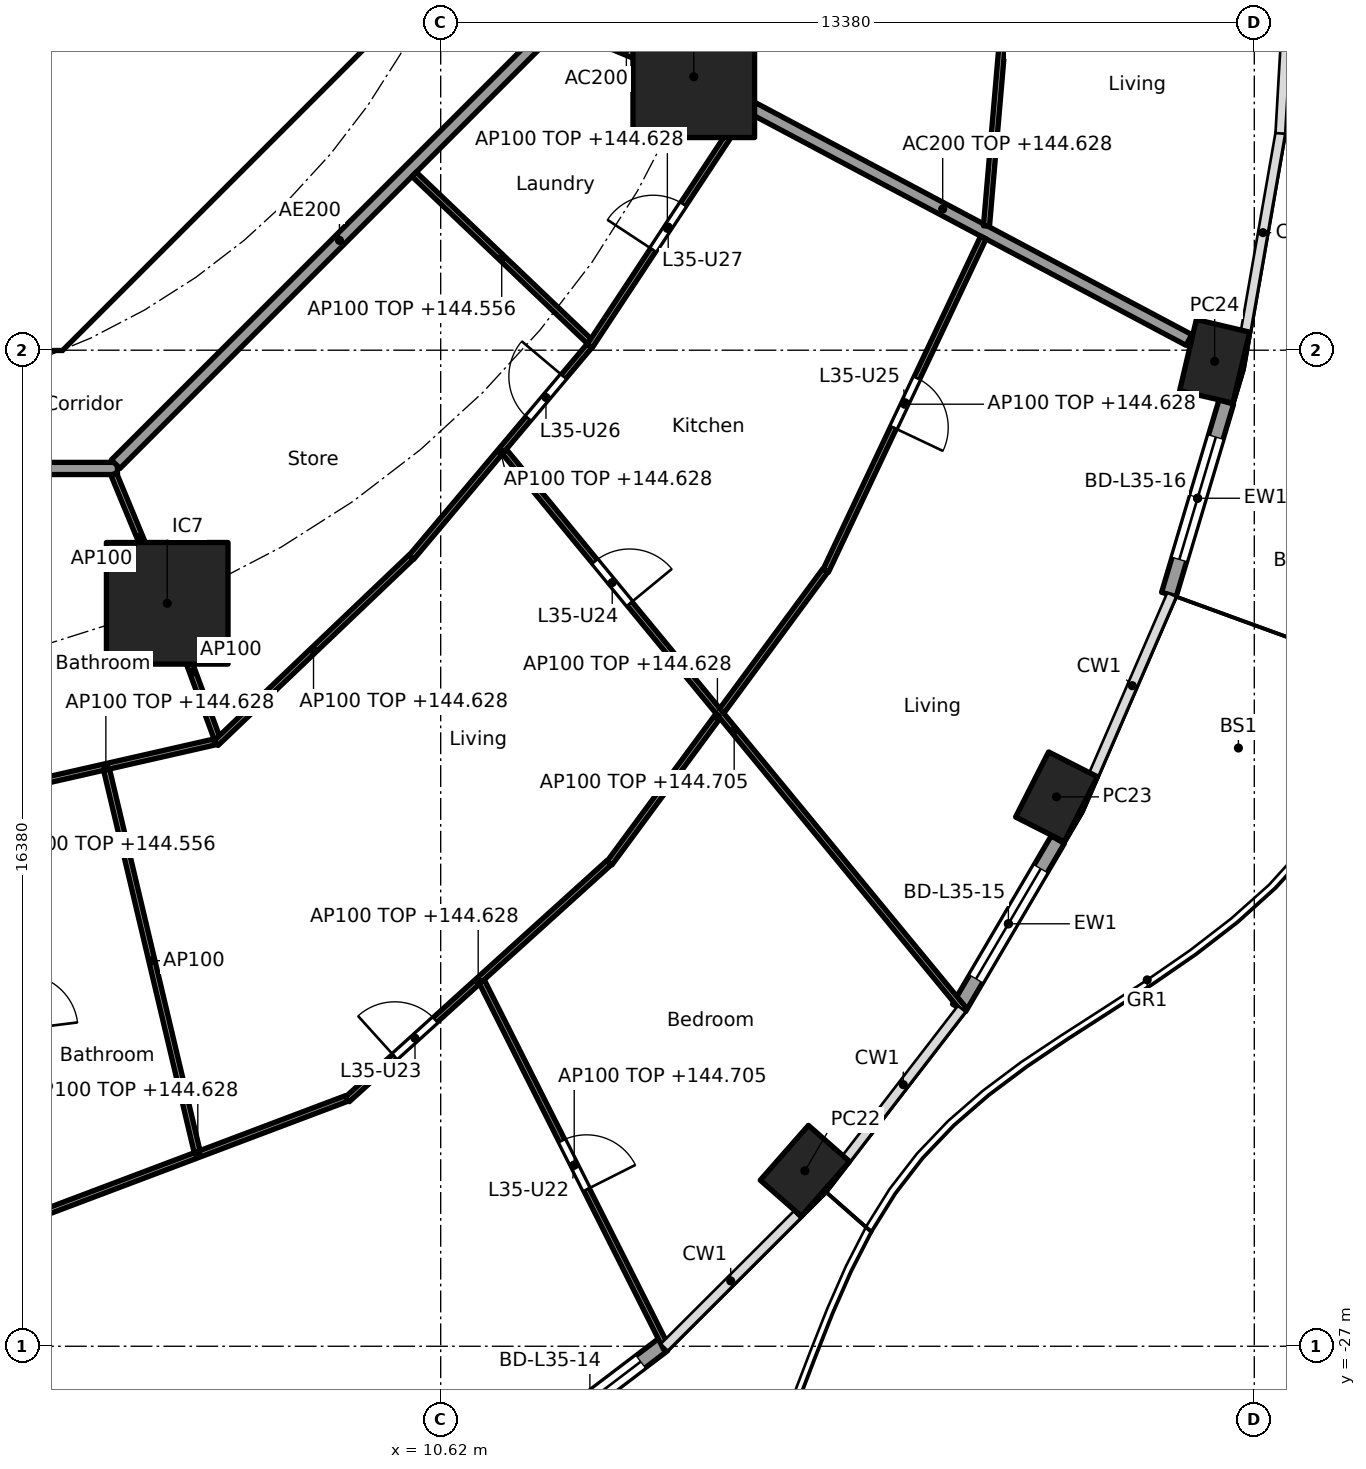
"""IFC4 building model, lengths in metres.
Left out: names, types, materials, properties, quantities, classifications, styles, units other than length and angle.
Written with IfcOpenShell. Run it as: python <this file> out.ifc"""

import sys

from ifc_helpers import new_model, si_unit, direction, frame, frame_2d, origin, origin_2d, place, context, subcontext, project, spatial, polyline, rectangle, hollow_rectangle, outline, extrude, element, fill, save


model = new_model("IFC4")
c1 = context("Model", 3, precision=1e-05, world=origin(), true_north=direction((0.0, 1.0)))
c2 = subcontext(c1, "Body", "Model", "MODEL_VIEW")
j1 = project(units=[si_unit("LENGTHUNIT", "METRE"), si_unit("PLANEANGLEUNIT", "RADIAN")], contexts=[c1])
p1 = place(None, origin())
s1 = spatial("IfcSite", under=j1, at=p1, CompositionType="ELEMENT")
p2 = place(p1, origin())
s2 = spatial("IfcBuilding", under=s1, at=p2, CompositionType="ELEMENT")
p3 = place(p2, frame((0.0, 0.0, 141.8)))
s3 = spatial("IfcBuildingStorey", under=s2, at=p3, CompositionType="ELEMENT", Elevation=141.8)
for number, where, z_axis, x_axis in (
    (1, (16.61, -24.115, 0.0), (0.0, 0.0, 1.0), (0.66, 0.751, 0.0)),
    (2, (20.747, -17.965, 0.0), (0.0, 0.0, 1.0), (0.452, 0.892, 0.0)),
    (3, (23.348, -10.803, 0.0), (0.0, 0.0, 1.0), (0.229, 0.973, 0.0)),
):
    element("IfcColumn", number, at=place(p3, frame(where, z_axis=z_axis, x_axis=x_axis)), inside=s3, PredefinedType="COLUMN", context=c2, shape_type="SweptSolid", body=[
        extrude(hollow_rectangle(XDim=1.2, YDim=0.9, WallThickness=0.04, at=origin_2d()), origin(), (0.0, 0.0, 1.0), 3.7),
    ])
for number, where, z_axis, x_axis in (
    (4, (6.123, -14.782, 0.0), (0.0, 0.0, 1.0), (1.0, 0.0, 0.0)),
    (5, (14.782, -6.123, 0.0), (0.0, 0.0, 1.0), (1.0, 0.0, 0.0)),
):
    element("IfcColumn", number, at=place(p3, frame(where, z_axis=z_axis, x_axis=x_axis)), inside=s3, PredefinedType="COLUMN", context=c2, shape_type="SweptSolid", body=[
        extrude(rectangle(XDim=2.0, YDim=2.0, at=origin_2d()), origin(), (0.0, 0.0, 1.0), 3.7),
    ])
p4 = place(p3, frame((14.278, -26.973, 0.0), z_axis=(0.0, 0.0, 1.0), x_axis=(-0.796022231079, -0.605267385233, 0.0)))
e6 = element("IfcWall", 6, at=p4, inside=s3, PredefinedType="SOLIDWALL", context=c2, shape_type="SweptSolid", body=[
    extrude(rectangle(XDim=3.026, YDim=0.25, at=frame_2d((1.513, 0.0))), origin(), (0.0, 0.0, 1.0), 3.44),
])
p5 = place(p4, frame((0.463, 0.0, 0.0)))
e7 = element("IfcOpeningElement", 7, at=p5, cuts=e6, PredefinedType="OPENING", context=c2, shape_type="SweptSolid", body=[
    extrude(rectangle(XDim=2.1, YDim=2.4, at=frame_2d((1.05, 1.2))), frame((0.0, 0.135, 0.0), z_axis=(0.0, -1.0, 0.0), x_axis=(1.0, 0.0, 0.0)), (0.0, 0.0, 1.0), 0.27),
])
p6 = place(p3, frame((20.768, -18.669, 0.0), z_axis=(0.0, 0.0, 1.0), x_axis=(-0.506314982873, -0.862348617508, 0.0)))
e8 = element("IfcWall", 8, at=p6, inside=s3, PredefinedType="SOLIDWALL", context=c2, shape_type="SweptSolid", body=[
    extrude(rectangle(XDim=3.208, YDim=0.25, at=frame_2d((1.604, 0.0))), origin(), (0.0, 0.0, 1.0), 3.44),
])
p7 = place(p6, frame((0.554, 0.0, 0.0)))
e9 = element("IfcOpeningElement", 9, at=p7, cuts=e8, PredefinedType="OPENING", context=c2, shape_type="SweptSolid", body=[
    extrude(rectangle(XDim=2.1, YDim=2.4, at=frame_2d((1.05, 1.2))), frame((0.0, 0.135, 0.0), z_axis=(0.0, -1.0, 0.0), x_axis=(1.0, 0.0, 0.0)), (0.0, 0.0, 1.0), 0.27),
])
p8 = place(p3, frame((23.54, -11.472, 0.0), z_axis=(0.0, 0.0, 1.0), x_axis=(-0.285821792767, -0.958282788523, 0.0)))
e10 = element("IfcWall", 10, at=p8, inside=s3, PredefinedType="SOLIDWALL", context=c2, shape_type="SweptSolid", body=[
    extrude(rectangle(XDim=3.303, YDim=0.25, at=frame_2d((1.651, 0.0))), origin(), (0.0, 0.0, 1.0), 3.44),
])
p9 = place(p8, frame((0.602, 0.0, 0.0)))
e11 = element("IfcOpeningElement", 11, at=p9, cuts=e10, PredefinedType="OPENING", context=c2, shape_type="SweptSolid", body=[
    extrude(rectangle(XDim=2.1, YDim=2.4, at=frame_2d((1.05, 1.2))), frame((0.0, 0.135, 0.0), z_axis=(0.0, -1.0, 0.0), x_axis=(1.0, 0.0, 0.0)), (0.0, 0.0, 1.0), 0.27),
])
p10 = place(p3, frame((4.613, -9.988, 0.0), z_axis=(0.0, 0.0, 1.0), x_axis=(0.707106781187, 0.707106781187, 0.0)))
e12 = element("IfcWall", 12, at=p10, inside=s3, PredefinedType="SHEAR", context=c2, shape_type="SweptSolid", body=[
    extrude(rectangle(XDim=7.602, YDim=0.6, at=frame_2d((3.801, 0.0))), origin(), (0.0, 0.0, 1.0), 3.44),
])
p11 = place(p10, frame((3.201, 0.0, 0.0)))
e13 = element("IfcOpeningElement", 13, at=p11, cuts=e12, PredefinedType="OPENING", context=c2, shape_type="SweptSolid", body=[
    extrude(rectangle(XDim=1.2, YDim=2.1, at=frame_2d((0.6, 1.05))), frame((0.0, 0.31, 0.0), z_axis=(0.0, -1.0, 0.0), x_axis=(1.0, 0.0, 0.0)), (0.0, 0.0, 1.0), 0.62),
])
p12 = place(p3, origin())
e14 = element("IfcWall", 14, at=p12, inside=s3, PredefinedType="SHEAR", context=c2, shape_type="SweptSolid", body=[
    extrude(outline(polyline([(-4.152, -10.025), (4.152, -10.025), (4.401, -9.776), (4.825, -10.2), (4.401, -10.625), (-4.401, -10.625), (-4.825, -10.2), (-4.401, -9.776), (-4.152, -10.025)])), origin(), (0.0, 0.0, 1.0), 3.44),
])
p13 = place(p3, frame((12.657, -5.243, 0.0), z_axis=(0.0, 0.0, 1.0), x_axis=(0.923846436004, -0.382763324632, 0.0)))
e15 = element("IfcWall", 15, at=p13, inside=s3, PredefinedType="PARTITIONING", context=c2, shape_type="SweptSolid", body=[
    extrude(rectangle(XDim=2.2, YDim=0.2, at=frame_2d((1.1, 0.0))), origin(), (0.0, 0.0, 1.0), 3.44),
])
p14 = place(p3, frame((14.826, -6.146, 0.0), z_axis=(0.0, 0.0, 1.0), x_axis=(0.883012998471, -0.469348532044, 0.0)))
e16 = element("IfcWall", 16, at=p14, inside=s3, PredefinedType="PARTITIONING", context=c2, shape_type="SweptSolid", body=[
    extrude(rectangle(XDim=9.172, YDim=0.2, at=frame_2d((4.586, 0.0))), origin(), (0.0, 0.0, 1.0), 2.828),
])
p15 = place(p3, frame((-5.104, -12.565, 0.0), z_axis=(0.0, 0.0, 1.0), x_axis=(1.0, 0.0, 0.0)))
e17 = element("IfcWall", 17, at=p15, inside=s3, PredefinedType="PARTITIONING", context=c2, shape_type="SweptSolid", body=[
    extrude(rectangle(XDim=10.409, YDim=0.2, at=frame_2d((5.205, 0.0))), origin(), (0.0, 0.0, 1.0), 3.44),
])
p16 = place(p15, frame((5.906, 0.0, 0.0)))
e18 = element("IfcOpeningElement", 18, at=p16, cuts=e17, PredefinedType="OPENING", context=c2, shape_type="SweptSolid", body=[
    extrude(rectangle(XDim=1.0, YDim=2.1, at=frame_2d((0.5, 1.05))), frame((0.0, 0.11, 0.0), z_axis=(0.0, -1.0, 0.0), x_axis=(1.0, 0.0, 0.0)), (0.0, 0.0, 1.0), 0.22),
])
p17 = place(p3, frame((5.275, -12.494, 0.0), z_axis=(0.0, 0.0, 1.0), x_axis=(0.707106781187, 0.707106781187, 0.0)))
e19 = element("IfcWall", 19, at=p17, inside=s3, PredefinedType="PARTITIONING", context=c2, shape_type="SweptSolid", body=[
    extrude(rectangle(XDim=10.409, YDim=0.2, at=frame_2d((5.205, 0.0))), origin(), (0.0, 0.0, 1.0), 3.44),
])
p18 = place(p3, frame((15.849, -2.158, 0.0), z_axis=(0.0, 0.0, 1.0), x_axis=(-0.03838348155, -0.999263082648, 0.0)))
e20 = element("IfcWall", 20, at=p18, inside=s3, PredefinedType="PARTITIONING", context=c2, shape_type="SweptSolid", body=[
    extrude(rectangle(XDim=4.344, YDim=0.1, at=frame_2d((2.172, 0.0))), origin(), (0.0, 0.0, 1.0), 3.44),
])
p19 = place(p3, frame((20.106, -2.642, 0.0), z_axis=(0.0, 0.0, 1.0), x_axis=(-0.085694058383, -0.996321498492, 0.0)))
e21 = element("IfcWall", 21, at=p19, inside=s3, PredefinedType="PARTITIONING", context=c2, shape_type="SweptSolid", body=[
    extrude(rectangle(XDim=5.957, YDim=0.1, at=frame_2d((2.979, 0.0))), origin(), (0.0, 0.0, 1.0), 2.828),
])
p20 = place(p3, frame((3.317, -17.878, 0.0), z_axis=(0.0, 0.0, 1.0), x_axis=(0.975099660451, 0.221767112505, 0.0)))
e22 = element("IfcWall", 22, at=p20, inside=s3, PredefinedType="PARTITIONING", context=c2, shape_type="SweptSolid", body=[
    extrude(rectangle(XDim=3.686, YDim=0.1, at=frame_2d((1.843, 0.0))), origin(), (0.0, 0.0, 1.0), 2.828),
])
p21 = place(p3, frame((4.178, -24.773, 0.0), z_axis=(0.0, 0.0, 1.0), x_axis=(0.935585145124, 0.353101169955, 0.0)))
e23 = element("IfcWall", 23, at=p21, inside=s3, PredefinedType="PARTITIONING", context=c2, shape_type="SweptSolid", body=[
    extrude(rectangle(XDim=5.233, YDim=0.1, at=frame_2d((2.617, 0.0))), origin(), (0.0, 0.0, 1.0), 2.828),
])
p22 = place(p3, frame((5.125, -17.518, 0.0), z_axis=(0.0, 0.0, 1.0), x_axis=(0.230621848401, -0.973043453829, 0.0)))
e24 = element("IfcWall", 24, at=p22, inside=s3, PredefinedType="PARTITIONING", context=c2, shape_type="SweptSolid", body=[
    extrude(rectangle(XDim=6.457, YDim=0.1, at=frame_2d((3.228, 0.0))), origin(), (0.0, 0.0, 1.0), 3.44),
])
p23 = place(p3, frame((5.243, -12.657, 0.0), z_axis=(0.0, 0.0, 1.0), x_axis=(0.382703272338, -0.923871314276, 0.0)))
e25 = element("IfcWall", 25, at=p23, inside=s3, PredefinedType="PARTITIONING", context=c2, shape_type="SweptSolid", body=[
    extrude(rectangle(XDim=2.249, YDim=0.1, at=frame_2d((1.125, 0.0))), origin(), (0.0, 0.0, 1.0), 3.44),
])
p24 = place(p3, frame((6.14, -14.829, 0.0), z_axis=(0.0, 0.0, 1.0), x_axis=(0.346198576881, -0.938161257655, 0.0)))
e26 = element("IfcWall", 26, at=p24, inside=s3, PredefinedType="PARTITIONING", context=c2, shape_type="SweptSolid", body=[
    extrude(rectangle(XDim=2.317, YDim=0.1, at=frame_2d((1.158, 0.0))), origin(), (0.0, 0.0, 1.0), 3.44),
])
p25 = place(p3, frame((6.923, -17.084, 0.0), z_axis=(0.0, 0.0, 1.0), x_axis=(0.723719008606, 0.690094773623, 0.0)))
e27 = element("IfcWall", 27, at=p25, inside=s3, PredefinedType="PARTITIONING", context=c2, shape_type="SweptSolid", body=[
    extrude(rectangle(XDim=4.436, YDim=0.1, at=frame_2d((2.218, 0.0))), origin(), (0.0, 0.0, 1.0), 2.828),
])
p26 = place(p3, frame((9.084, -22.941, 0.0), z_axis=(0.0, 0.0, 1.0), x_axis=(0.741684187175, 0.670749257543, 0.0)))
e28 = element("IfcWall", 28, at=p26, inside=s3, PredefinedType="PARTITIONING", context=c2, shape_type="SweptSolid", body=[
    extrude(rectangle(XDim=5.806, YDim=0.1, at=frame_2d((2.903, 0.0))), origin(), (0.0, 0.0, 1.0), 2.828),
])
p27 = place(p26, frame((1.052, 0.0, 0.0)))
e29 = element("IfcOpeningElement", 29, at=p27, cuts=e28, PredefinedType="OPENING", context=c2, shape_type="SweptSolid", body=[
    extrude(rectangle(XDim=0.9, YDim=2.1, at=frame_2d((0.45, 1.05))), frame((0.0, 0.06, 0.0), z_axis=(0.0, -1.0, 0.0), x_axis=(1.0, 0.0, 0.0)), (0.0, 0.0, 1.0), 0.12),
])
p28 = place(p3, frame((11.296, -21.005, 0.0), z_axis=(0.0, 0.0, 1.0), x_axis=(0.44991509116, -0.893071335755, 0.0)))
e30 = element("IfcWall", 30, at=p28, inside=s3, PredefinedType="PARTITIONING", context=c2, shape_type="SweptSolid", body=[
    extrude(rectangle(XDim=6.755, YDim=0.1, at=frame_2d((3.377, 0.0))), origin(), (0.0, 0.0, 1.0), 2.905),
])
p29 = place(p28, frame((2.927, 0.0, 0.0)))
e31 = element("IfcOpeningElement", 31, at=p29, cuts=e30, PredefinedType="OPENING", context=c2, shape_type="SweptSolid", body=[
    extrude(rectangle(XDim=0.9, YDim=2.1, at=frame_2d((0.45, 1.05))), frame((0.0, 0.06, 0.0), z_axis=(0.0, -1.0, 0.0), x_axis=(1.0, 0.0, 0.0)), (0.0, 0.0, 1.0), 0.12),
])
p30 = place(p3, frame((10.138, -14.026, 0.0), z_axis=(0.0, 0.0, 1.0), x_axis=(0.644051444483, 0.764982180746, 0.0)))
e32 = element("IfcWall", 32, at=p30, inside=s3, PredefinedType="PARTITIONING", context=c2, shape_type="SweptSolid", body=[
    extrude(rectangle(XDim=4.548, YDim=0.1, at=frame_2d((2.274, 0.0))), origin(), (0.0, 0.0, 1.0), 2.828),
])
p31 = place(p30, frame((2.986, 0.0, 0.0)))
e33 = element("IfcOpeningElement", 33, at=p31, cuts=e32, PredefinedType="OPENING", context=c2, shape_type="SweptSolid", body=[
    extrude(rectangle(XDim=0.9, YDim=2.1, at=frame_2d((0.45, 1.05))), frame((0.0, 0.06, 0.0), z_axis=(0.0, -1.0, 0.0), x_axis=(1.0, 0.0, 0.0)), (0.0, 0.0, 1.0), 0.12),
])
p32 = place(p3, frame((13.397, -19.053, 0.0), z_axis=(0.0, 0.0, 1.0), x_axis=(0.593522299069, 0.804817544856, 0.0)))
e34 = element("IfcWall", 34, at=p32, inside=s3, PredefinedType="PARTITIONING", context=c2, shape_type="SweptSolid", body=[
    extrude(rectangle(XDim=5.976, YDim=0.1, at=frame_2d((2.988, 0.0))), origin(), (0.0, 0.0, 1.0), 2.828),
])
p33 = place(p3, frame((11.667, -12.287, 0.0), z_axis=(0.0, 0.0, 1.0), x_axis=(0.635618027424, -0.772003706736, 0.0)))
e35 = element("IfcWall", 35, at=p33, inside=s3, PredefinedType="PARTITIONING", context=c2, shape_type="SweptSolid", body=[
    extrude(rectangle(XDim=11.893, YDim=0.1, at=frame_2d((5.947, 0.0))), origin(), (0.0, 0.0, 1.0), 2.905),
])
p34 = place(p33, frame((2.341, 0.0, 0.0)))
e36 = element("IfcOpeningElement", 36, at=p34, cuts=e35, PredefinedType="OPENING", context=c2, shape_type="SweptSolid", body=[
    extrude(rectangle(XDim=0.9, YDim=2.1, at=frame_2d((0.45, 1.05))), frame((0.0, 0.06, 0.0), z_axis=(0.0, -1.0, 0.0), x_axis=(1.0, 0.0, 0.0)), (0.0, 0.0, 1.0), 0.12),
])
p35 = place(p3, frame((10.184, -7.727, 0.0), z_axis=(0.0, 0.0, 1.0), x_axis=(0.723654892782, -0.690162007179, 0.0)))
e37 = element("IfcWall", 37, at=p35, inside=s3, PredefinedType="PARTITIONING", context=c2, shape_type="SweptSolid", body=[
    extrude(rectangle(XDim=3.98, YDim=0.1, at=frame_2d((1.99, 0.0))), origin(), (0.0, 0.0, 1.0), 2.756),
])
p36 = place(p3, frame((13.072, -10.55, 0.0), z_axis=(0.0, 0.0, 1.0), x_axis=(0.550607247415, 0.834764433295, 0.0)))
e38 = element("IfcWall", 38, at=p36, inside=s3, PredefinedType="PARTITIONING", context=c2, shape_type="SweptSolid", body=[
    extrude(rectangle(XDim=4.633, YDim=0.1, at=frame_2d((2.316, 0.0))), origin(), (0.0, 0.0, 1.0), 2.828),
])
p37 = place(p36, frame((1.891, 0.0, 0.0)))
e39 = element("IfcOpeningElement", 39, at=p37, cuts=e38, PredefinedType="OPENING", context=c2, shape_type="SweptSolid", body=[
    extrude(rectangle(XDim=0.9, YDim=2.1, at=frame_2d((0.45, 1.05))), frame((0.0, 0.06, 0.0), z_axis=(0.0, -1.0, 0.0), x_axis=(1.0, 0.0, 0.0)), (0.0, 0.0, 1.0), 0.12),
])
p38 = place(p3, frame((16.953, -14.249, 0.0), z_axis=(0.0, 0.0, 1.0), x_axis=(0.427438858397, 0.904044259056, 0.0)))
e40 = element("IfcWall", 40, at=p38, inside=s3, PredefinedType="PARTITIONING", context=c2, shape_type="SweptSolid", body=[
    extrude(rectangle(XDim=6.063, YDim=0.1, at=frame_2d((3.031, 0.0))), origin(), (0.0, 0.0, 1.0), 2.828),
])
p39 = place(p38, frame((2.607, 0.0, 0.0)))
e41 = element("IfcOpeningElement", 41, at=p39, cuts=e40, PredefinedType="OPENING", context=c2, shape_type="SweptSolid", body=[
    extrude(rectangle(XDim=0.9, YDim=2.1, at=frame_2d((0.45, 1.05))), frame((0.0, 0.06, 0.0), z_axis=(0.0, -1.0, 0.0), x_axis=(1.0, 0.0, 0.0)), (0.0, 0.0, 1.0), 0.12),
])
p40 = place(p5, origin())
e42 = element("IfcDoor", 42, at=p40, inside=s3, OperationType="SLIDING_TO_LEFT", PredefinedType="DOOR", context=c2, shape_type="SweptSolid", body=[
    extrude(rectangle(XDim=2.1, YDim=2.4, at=frame_2d((1.05, 1.2))), frame((0.0, 0.025, 0.0), z_axis=(0.0, -1.0, 0.0), x_axis=(1.0, 0.0, 0.0)), (0.0, 0.0, 1.0), 0.05),
])
fill(e7, e42)
p41 = place(p7, origin())
e43 = element("IfcDoor", 43, at=p41, inside=s3, OperationType="SLIDING_TO_LEFT", PredefinedType="DOOR", context=c2, shape_type="SweptSolid", body=[
    extrude(rectangle(XDim=2.1, YDim=2.4, at=frame_2d((1.05, 1.2))), frame((0.0, 0.025, 0.0), z_axis=(0.0, -1.0, 0.0), x_axis=(1.0, 0.0, 0.0)), (0.0, 0.0, 1.0), 0.05),
])
fill(e9, e43)
p42 = place(p9, origin())
e44 = element("IfcDoor", 44, at=p42, inside=s3, OperationType="SLIDING_TO_LEFT", PredefinedType="DOOR", context=c2, shape_type="SweptSolid", body=[
    extrude(rectangle(XDim=2.1, YDim=2.4, at=frame_2d((1.05, 1.2))), frame((0.0, 0.025, 0.0), z_axis=(0.0, -1.0, 0.0), x_axis=(1.0, 0.0, 0.0)), (0.0, 0.0, 1.0), 0.05),
])
fill(e11, e44)
p43 = place(p11, origin())
e45 = element("IfcDoor", 45, at=p43, inside=s3, OperationType="SINGLE_SWING_RIGHT", PredefinedType="DOOR", context=c2, shape_type="SweptSolid", body=[
    extrude(rectangle(XDim=1.2, YDim=2.1, at=frame_2d((0.6, 1.05))), frame((0.0, 0.025, 0.0), z_axis=(0.0, -1.0, 0.0), x_axis=(1.0, 0.0, 0.0)), (0.0, 0.0, 1.0), 0.05),
])
fill(e13, e45)
p44 = place(p29, origin())
e46 = element("IfcDoor", 46, at=p44, inside=s3, OperationType="SINGLE_SWING_RIGHT", PredefinedType="DOOR", context=c2, shape_type="SweptSolid", body=[
    extrude(rectangle(XDim=0.9, YDim=2.1, at=frame_2d((0.45, 1.05))), frame((0.0, 0.025, 0.0), z_axis=(0.0, -1.0, 0.0), x_axis=(1.0, 0.0, 0.0)), (0.0, 0.0, 1.0), 0.05),
])
fill(e31, e46)
p45 = place(p27, origin())
e47 = element("IfcDoor", 47, at=p45, inside=s3, OperationType="SINGLE_SWING_LEFT", PredefinedType="DOOR", context=c2, shape_type="SweptSolid", body=[
    extrude(rectangle(XDim=0.9, YDim=2.1, at=frame_2d((0.45, 1.05))), frame((0.0, 0.025, 0.0), z_axis=(0.0, -1.0, 0.0), x_axis=(1.0, 0.0, 0.0)), (0.0, 0.0, 1.0), 0.05),
])
fill(e29, e47)
p46 = place(p34, origin())
e48 = element("IfcDoor", 48, at=p46, inside=s3, OperationType="SINGLE_SWING_RIGHT", PredefinedType="DOOR", context=c2, shape_type="SweptSolid", body=[
    extrude(rectangle(XDim=0.9, YDim=2.1, at=frame_2d((0.45, 1.05))), frame((0.0, 0.025, 0.0), z_axis=(0.0, -1.0, 0.0), x_axis=(1.0, 0.0, 0.0)), (0.0, 0.0, 1.0), 0.05),
])
fill(e36, e48)
p47 = place(p39, frame((0.9, 0.0, 0.0), x_axis=(-1.0, 0.0, 0.0)))
e49 = element("IfcDoor", 49, at=p47, inside=s3, OperationType="SINGLE_SWING_RIGHT", PredefinedType="DOOR", context=c2, shape_type="SweptSolid", body=[
    extrude(rectangle(XDim=0.9, YDim=2.1, at=frame_2d((0.45, 1.05))), frame((0.0, 0.025, 0.0), z_axis=(0.0, -1.0, 0.0), x_axis=(1.0, 0.0, 0.0)), (0.0, 0.0, 1.0), 0.05),
])
fill(e41, e49)
p48 = place(p31, origin())
e50 = element("IfcDoor", 50, at=p48, inside=s3, OperationType="SINGLE_SWING_RIGHT", PredefinedType="DOOR", context=c2, shape_type="SweptSolid", body=[
    extrude(rectangle(XDim=0.9, YDim=2.1, at=frame_2d((0.45, 1.05))), frame((0.0, 0.025, 0.0), z_axis=(0.0, -1.0, 0.0), x_axis=(1.0, 0.0, 0.0)), (0.0, 0.0, 1.0), 0.05),
])
fill(e33, e50)
p49 = place(p37, origin())
e51 = element("IfcDoor", 51, at=p49, inside=s3, OperationType="SINGLE_SWING_LEFT", PredefinedType="DOOR", context=c2, shape_type="SweptSolid", body=[
    extrude(rectangle(XDim=0.9, YDim=2.1, at=frame_2d((0.45, 1.05))), frame((0.0, 0.025, 0.0), z_axis=(0.0, -1.0, 0.0), x_axis=(1.0, 0.0, 0.0)), (0.0, 0.0, 1.0), 0.05),
])
fill(e39, e51)
save(model, sys.argv[1])
